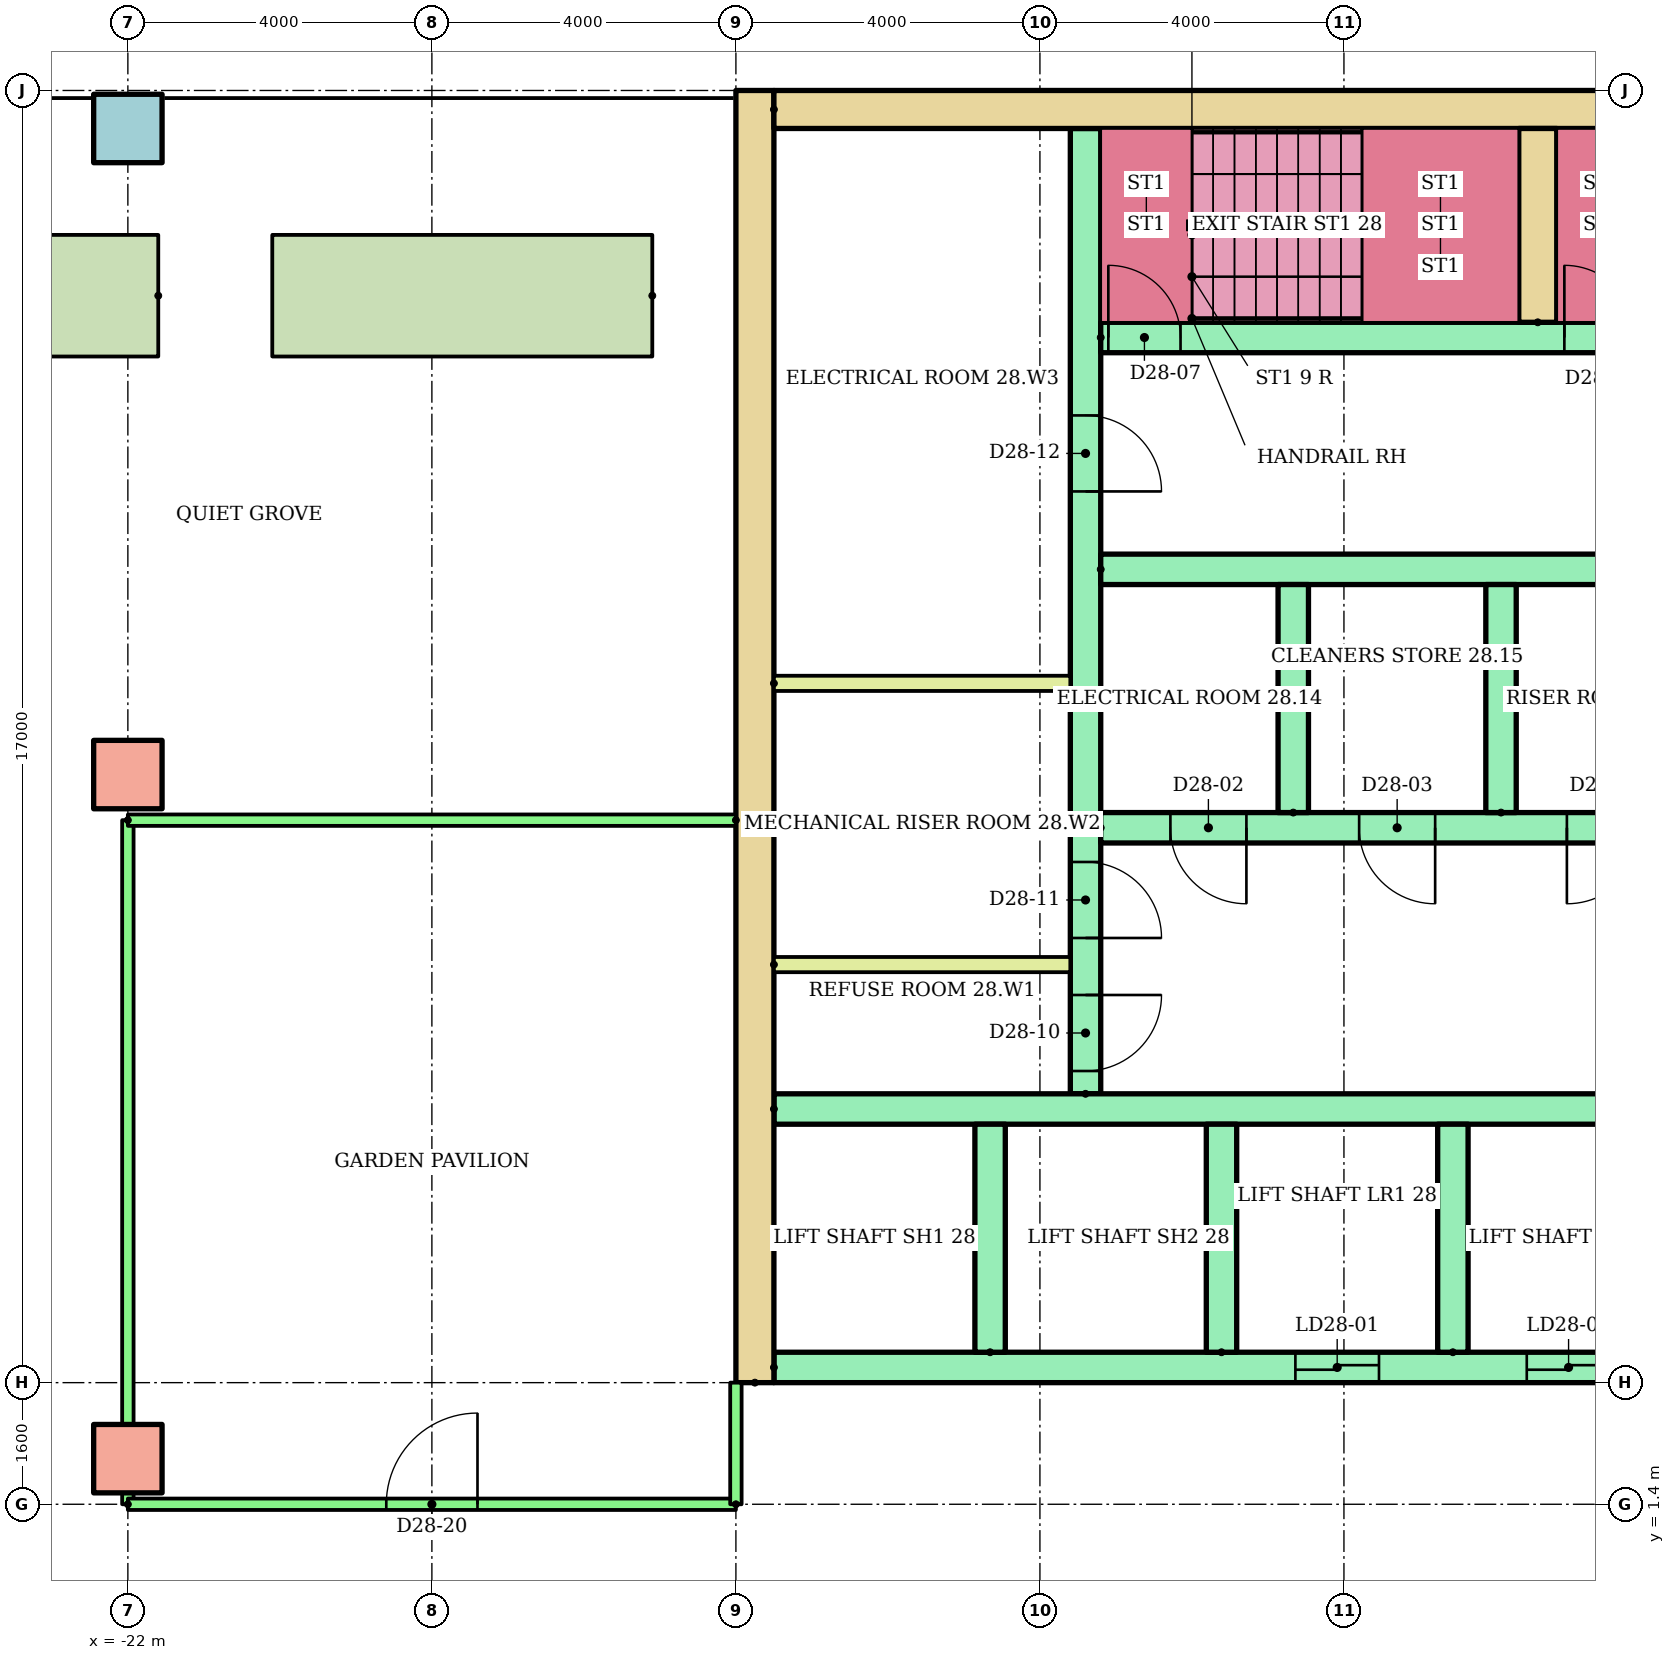
"""IFC4 building model, lengths in metres.
Left out: names, types, materials, properties, quantities, classifications, styles, units other than length and angle.
Written with IfcOpenShell. Run it as: python <this file> out.ifc"""

import sys

from ifc_helpers import new_model, si_unit, direction, frame, frame_2d, origin, origin_2d, place, context, subcontext, project, spatial, rectangle, hollow_rectangle, extrude, element, fill, save


model = new_model("IFC4")
c1 = context("Model", 3, precision=1e-05, world=origin(), true_north=direction((0.0, 1.0)))
c2 = subcontext(c1, "Body", "Model", "MODEL_VIEW")
j1 = project(units=[si_unit("LENGTHUNIT", "METRE"), si_unit("PLANEANGLEUNIT", "RADIAN")], contexts=[c1])
p1 = place(None, origin())
s1 = spatial("IfcSite", under=j1, at=p1, CompositionType="ELEMENT")
p2 = place(p1, origin())
s2 = spatial("IfcBuilding", under=s1, at=p2, CompositionType="ELEMENT")
p3 = place(p2, frame((0.0, 0.0, 106.3)))
s3 = spatial("IfcBuildingStorey", under=s2, at=p3, CompositionType="ELEMENT", Elevation=106.3)
for number, where in (
    (1, (-22.0, 2.0, 0.0)),
    (2, (-22.0, 11.0, 0.0)),
):
    element("IfcColumn", number, at=place(p3, frame(where)), inside=s3, PredefinedType="COLUMN", context=c2, shape_type="SweptSolid", body=[
        extrude(rectangle(XDim=0.9, YDim=0.9, at=origin_2d()), origin(), (0.0, 0.0, 1.0), 9.6),
    ])
p4 = place(p3, frame((-22.0, 19.5, 0.0)))
e3 = element("IfcColumn", 3, at=p4, inside=s3, PredefinedType="COLUMN", context=c2, shape_type="SweptSolid", body=[
    extrude(hollow_rectangle(XDim=0.9, YDim=0.9, WallThickness=0.045, at=origin_2d()), origin(), (0.0, 0.0, 1.0), 9.6),
])
p5 = place(p3, frame((-15.1, 17.3, 0.0), z_axis=(0.0, 0.0, 1.0), x_axis=(-1.0, 0.0, 0.0)))
e4 = element("IfcWall", 4, at=p5, inside=s3, PredefinedType="STANDARD", context=c2, shape_type="SweptSolid", body=[
    extrude(rectangle(XDim=5.0, YDim=1.6, at=frame_2d((2.5, 0.0))), origin(), (0.0, 0.0, 1.0), 0.8),
])
p6 = place(p3, frame((-21.6, 17.3, 0.0), z_axis=(0.0, 0.0, 1.0), x_axis=(-1.0, 0.0, 0.0)))
e5 = element("IfcWall", 5, at=p6, inside=s3, PredefinedType="STANDARD", context=c2, shape_type="SweptSolid", body=[
    extrude(rectangle(XDim=2.1, YDim=1.6, at=frame_2d((1.05, 0.0))), origin(), (0.0, 0.0, 1.0), 0.8),
])
p7 = place(p3, frame((-13.75, 3.0, 0.0), z_axis=(0.0, 0.0, 1.0), x_axis=(0.0, 1.0, 0.0)))
e6 = element("IfcWall", 6, at=p7, inside=s3, PredefinedType="SHEAR", context=c2, shape_type="SweptSolid", body=[
    extrude(rectangle(XDim=17.0, YDim=0.5, at=frame_2d((8.5, 0.0))), origin(), (0.0, 0.0, 1.0), 8.8),
])
p8 = place(p3, frame((-13.5, 19.75, 0.0)))
e7 = element("IfcWall", 7, at=p8, inside=s3, PredefinedType="SHEAR", context=c2, shape_type="SweptSolid", body=[
    extrude(rectangle(XDim=27.0, YDim=0.5, at=frame_2d((13.5, 0.0))), origin(), (0.0, 0.0, 1.0), 8.8),
])
p9 = place(p3, frame((-9.4, 6.8, 0.0), z_axis=(0.0, 0.0, 1.0), x_axis=(0.0, 1.0, 0.0)))
e8 = element("IfcWall", 8, at=p9, inside=s3, PredefinedType="SHEAR", context=c2, shape_type="SweptSolid", body=[
    extrude(rectangle(XDim=12.7, YDim=0.4, at=frame_2d((6.35, 0.0))), origin(), (0.0, 0.0, 1.0), 8.8),
])
p10 = place(p9, frame((0.3, 0.0, 0.0)))
e9 = element("IfcOpeningElement", 9, at=p10, cuts=e8, PredefinedType="OPENING", context=c2, shape_type="SweptSolid", body=[
    extrude(rectangle(XDim=1.0, YDim=2.1, at=frame_2d((0.5, 1.05))), frame((0.0, 0.21, 0.0), z_axis=(0.0, -1.0, 0.0), x_axis=(1.0, 0.0, 0.0)), (0.0, 0.0, 1.0), 0.42),
])
p11 = place(p9, frame((2.05, 0.0, 0.0)))
e10 = element("IfcOpeningElement", 10, at=p11, cuts=e8, PredefinedType="OPENING", context=c2, shape_type="SweptSolid", body=[
    extrude(rectangle(XDim=1.0, YDim=2.1, at=frame_2d((0.5, 1.05))), frame((0.0, 0.21, 0.0), z_axis=(0.0, -1.0, 0.0), x_axis=(1.0, 0.0, 0.0)), (0.0, 0.0, 1.0), 0.42),
])
p12 = place(p9, frame((7.925, 0.0, 0.0)))
e11 = element("IfcOpeningElement", 11, at=p12, cuts=e8, PredefinedType="OPENING", context=c2, shape_type="SweptSolid", body=[
    extrude(rectangle(XDim=1.0, YDim=2.1, at=frame_2d((0.5, 1.05))), frame((0.0, 0.21, 0.0), z_axis=(0.0, -1.0, 0.0), x_axis=(1.0, 0.0, 0.0)), (0.0, 0.0, 1.0), 0.42),
])
p13 = place(p3, frame((-13.5, 3.2, 0.0)))
e12 = element("IfcWall", 12, at=p13, inside=s3, PredefinedType="SHEAR", context=c2, shape_type="SweptSolid", body=[
    extrude(rectangle(XDim=27.0, YDim=0.4, at=frame_2d((13.5, 0.0))), origin(), (0.0, 0.0, 1.0), 8.8),
])
p14 = place(p13, frame((6.861, 0.0, 0.0)))
e13 = element("IfcOpeningElement", 13, at=p14, cuts=e12, PredefinedType="OPENING", context=c2, shape_type="SweptSolid", body=[
    extrude(rectangle(XDim=1.1, YDim=2.1, at=frame_2d((0.55, 1.05))), frame((0.0, 0.21, 0.0), z_axis=(0.0, -1.0, 0.0), x_axis=(1.0, 0.0, 0.0)), (0.0, 0.0, 1.0), 0.42),
])
p15 = place(p13, frame((9.906, 0.0, 0.0)))
e14 = element("IfcOpeningElement", 14, at=p15, cuts=e12, PredefinedType="OPENING", context=c2, shape_type="SweptSolid", body=[
    extrude(rectangle(XDim=1.1, YDim=2.1, at=frame_2d((0.55, 1.05))), frame((0.0, 0.21, 0.0), z_axis=(0.0, -1.0, 0.0), x_axis=(1.0, 0.0, 0.0)), (0.0, 0.0, 1.0), 0.42),
])
p16 = place(p13, frame((15.994, 0.0, 0.0)))
e15 = element("IfcOpeningElement", 15, at=p16, cuts=e12, PredefinedType="OPENING", context=c2, shape_type="SweptSolid", body=[
    extrude(rectangle(XDim=1.1, YDim=2.1, at=frame_2d((0.55, 1.05))), frame((0.0, 0.21, 0.0), z_axis=(0.0, -1.0, 0.0), x_axis=(1.0, 0.0, 0.0)), (0.0, 0.0, 1.0), 0.42),
])
p17 = place(p13, frame((19.039, 0.0, 0.0)))
e16 = element("IfcOpeningElement", 16, at=p17, cuts=e12, PredefinedType="OPENING", context=c2, shape_type="SweptSolid", body=[
    extrude(rectangle(XDim=1.1, YDim=2.1, at=frame_2d((0.55, 1.05))), frame((0.0, 0.21, 0.0), z_axis=(0.0, -1.0, 0.0), x_axis=(1.0, 0.0, 0.0)), (0.0, 0.0, 1.0), 0.42),
])
p18 = place(p13, frame((12.6, 0.0, 0.0)))
e17 = element("IfcOpeningElement", 17, at=p18, cuts=e12, PredefinedType="OPENING", context=c2, shape_type="SweptSolid", body=[
    extrude(rectangle(XDim=1.8, YDim=2.1, at=frame_2d((0.9, 1.05))), frame((0.0, 0.21, 0.0), z_axis=(0.0, -1.0, 0.0), x_axis=(1.0, 0.0, 0.0)), (0.0, 0.0, 1.0), 0.42),
])
p19 = place(p3, frame((-13.5, 6.6, 0.0)))
e18 = element("IfcWall", 18, at=p19, inside=s3, PredefinedType="SHEAR", context=c2, shape_type="SweptSolid", body=[
    extrude(rectangle(XDim=11.978, YDim=0.4, at=frame_2d((5.989, 0.0))), origin(), (0.0, 0.0, 1.0), 8.8),
])
for number, where, z_axis, x_axis in (
    (19, (-10.656, 3.4, 0.0), (0.0, 0.0, 1.0), (0.0, 1.0, 0.0)),
    (20, (-7.611, 3.4, 0.0), (0.0, 0.0, 1.0), (0.0, 1.0, 0.0)),
    (21, (-4.567, 3.4, 0.0), (0.0, 0.0, 1.0), (0.0, 1.0, 0.0)),
):
    element("IfcWall", number, at=place(p3, frame(where, z_axis=z_axis, x_axis=x_axis)), inside=s3, PredefinedType="SHEAR", context=c2, shape_type="SweptSolid", body=[
        extrude(rectangle(XDim=3.0, YDim=0.4, at=frame_2d((1.5, 0.0))), origin(), (0.0, 0.0, 1.0), 8.8),
    ])
p20 = place(p3, frame((-9.2, 10.3, 0.0)))
e22 = element("IfcWall", 22, at=p20, inside=s3, PredefinedType="SHEAR", context=c2, shape_type="SweptSolid", body=[
    extrude(rectangle(XDim=8.0, YDim=0.4, at=frame_2d((4.0, 0.0))), origin(), (0.0, 0.0, 1.0), 8.8),
])
p21 = place(p20, frame((0.917, 0.0, 0.0)))
e23 = element("IfcOpeningElement", 23, at=p21, cuts=e22, PredefinedType="OPENING", context=c2, shape_type="SweptSolid", body=[
    extrude(rectangle(XDim=1.0, YDim=2.1, at=frame_2d((0.5, 1.05))), frame((0.0, 0.21, 0.0), z_axis=(0.0, -1.0, 0.0), x_axis=(1.0, 0.0, 0.0)), (0.0, 0.0, 1.0), 0.42),
])
p22 = place(p20, frame((3.4, 0.0, 0.0)))
e24 = element("IfcOpeningElement", 24, at=p22, cuts=e22, PredefinedType="OPENING", context=c2, shape_type="SweptSolid", body=[
    extrude(rectangle(XDim=1.0, YDim=2.1, at=frame_2d((0.5, 1.05))), frame((0.0, 0.21, 0.0), z_axis=(0.0, -1.0, 0.0), x_axis=(1.0, 0.0, 0.0)), (0.0, 0.0, 1.0), 0.42),
])
p23 = place(p20, frame((6.133, 0.0, 0.0)))
e25 = element("IfcOpeningElement", 25, at=p23, cuts=e22, PredefinedType="OPENING", context=c2, shape_type="SweptSolid", body=[
    extrude(rectangle(XDim=1.0, YDim=2.1, at=frame_2d((0.5, 1.05))), frame((0.0, 0.21, 0.0), z_axis=(0.0, -1.0, 0.0), x_axis=(1.0, 0.0, 0.0)), (0.0, 0.0, 1.0), 0.42),
])
p24 = place(p3, frame((-9.2, 13.7, 0.0)))
e26 = element("IfcWall", 26, at=p24, inside=s3, PredefinedType="SHEAR", context=c2, shape_type="SweptSolid", body=[
    extrude(rectangle(XDim=8.0, YDim=0.4, at=frame_2d((4.0, 0.0))), origin(), (0.0, 0.0, 1.0), 8.8),
])
for number, where, z_axis, x_axis in (
    (27, (-6.667, 10.5, 0.0), (0.0, 0.0, 1.0), (0.0, 1.0, 0.0)),
    (28, (-3.933, 10.5, 0.0), (0.0, 0.0, 1.0), (0.0, 1.0, 0.0)),
):
    element("IfcWall", number, at=place(p3, frame(where, z_axis=z_axis, x_axis=x_axis)), inside=s3, PredefinedType="SHEAR", context=c2, shape_type="SweptSolid", body=[
        extrude(rectangle(XDim=3.0, YDim=0.4, at=frame_2d((1.5, 0.0))), origin(), (0.0, 0.0, 1.0), 8.8),
    ])
p25 = place(p3, frame((-9.2, 16.75, 0.0)))
e29 = element("IfcWall", 29, at=p25, inside=s3, PredefinedType="SHEAR", context=c2, shape_type="SweptSolid", body=[
    extrude(rectangle(XDim=18.4, YDim=0.4, at=frame_2d((9.2, 0.0))), origin(), (0.0, 0.0, 1.0), 8.8),
])
p26 = place(p25, frame((0.1, 0.0, 0.0)))
e30 = element("IfcOpeningElement", 30, at=p26, cuts=e29, PredefinedType="OPENING", context=c2, shape_type="SweptSolid", body=[
    extrude(rectangle(XDim=0.95, YDim=2.1, at=frame_2d((0.475, 1.05))), frame((0.0, 0.21, 0.0), z_axis=(0.0, -1.0, 0.0), x_axis=(1.0, 0.0, 0.0)), (0.0, 0.0, 1.0), 0.42),
])
p27 = place(p25, frame((6.1, 0.0, 0.0)))
e31 = element("IfcOpeningElement", 31, at=p27, cuts=e29, PredefinedType="OPENING", context=c2, shape_type="SweptSolid", body=[
    extrude(rectangle(XDim=0.95, YDim=2.1, at=frame_2d((0.475, 1.05))), frame((0.0, 0.21, 0.0), z_axis=(0.0, -1.0, 0.0), x_axis=(1.0, 0.0, 0.0)), (0.0, 0.0, 1.0), 0.42),
])
p28 = place(p25, frame((12.1, 0.0, 0.0)))
e32 = element("IfcOpeningElement", 32, at=p28, cuts=e29, PredefinedType="OPENING", context=c2, shape_type="SweptSolid", body=[
    extrude(rectangle(XDim=0.95, YDim=2.1, at=frame_2d((0.475, 1.05))), frame((0.0, 0.21, 0.0), z_axis=(0.0, -1.0, 0.0), x_axis=(1.0, 0.0, 0.0)), (0.0, 0.0, 1.0), 0.42),
])
p29 = place(p3, frame((-3.45, 16.95, 0.0), z_axis=(0.0, 0.0, 1.0), x_axis=(0.0, 1.0, 0.0)))
e33 = element("IfcWall", 33, at=p29, inside=s3, PredefinedType="SHEAR", context=c2, shape_type="SweptSolid", body=[
    extrude(rectangle(XDim=2.55, YDim=0.5, at=frame_2d((1.275, 0.0))), origin(), (0.0, 0.0, 1.0), 8.8),
])
for number, where in (
    (34, (-13.5, 8.5, 0.0)),
    (35, (-13.5, 12.2, 0.0)),
):
    element("IfcWall", number, at=place(p3, frame(where)), inside=s3, PredefinedType="PARTITIONING", context=c2, shape_type="SweptSolid", body=[
        extrude(rectangle(XDim=3.9, YDim=0.2, at=frame_2d((1.95, 0.0))), origin(), (0.0, 0.0, 1.0), 8.8),
    ])
p30 = place(p3, frame((-22.0, 10.4, 0.0), z_axis=(0.0, 0.0, 1.0), x_axis=(0.0, -1.0, 0.0)))
e36 = element("IfcWall", 36, at=p30, inside=s3, PredefinedType="PARTITIONING", context=c2, shape_type="SweptSolid", body=[
    extrude(rectangle(XDim=9.0, YDim=0.15, at=frame_2d((4.5, 0.0))), origin(), (0.0, 0.0, 1.0), 8.8),
])
p31 = place(p3, frame((-14.0, 10.4, 0.0), z_axis=(0.0, 0.0, 1.0), x_axis=(-1.0, 0.0, 0.0)))
e37 = element("IfcWall", 37, at=p31, inside=s3, PredefinedType="PARTITIONING", context=c2, shape_type="SweptSolid", body=[
    extrude(rectangle(XDim=8.0, YDim=0.15, at=frame_2d((4.0, 0.0))), origin(), (0.0, 0.0, 1.0), 8.8),
])
p32 = place(p3, frame((-22.0, 1.4, 0.0)))
e38 = element("IfcWall", 38, at=p32, inside=s3, PredefinedType="PARTITIONING", context=c2, shape_type="SweptSolid", body=[
    extrude(rectangle(XDim=8.0, YDim=0.15, at=frame_2d((4.0, 0.0))), origin(), (0.0, 0.0, 1.0), 8.8),
])
p33 = place(p32, frame((3.4, 0.0, 0.0)))
e39 = element("IfcOpeningElement", 39, at=p33, cuts=e38, PredefinedType="OPENING", context=c2, shape_type="SweptSolid", body=[
    extrude(rectangle(XDim=1.2, YDim=2.1, at=frame_2d((0.6, 1.05))), frame((0.0, 0.085, 0.0), z_axis=(0.0, -1.0, 0.0), x_axis=(1.0, 0.0, 0.0)), (0.0, 0.0, 1.0), 0.17),
])
p34 = place(p3, frame((-14.0, 1.4, 0.0), z_axis=(0.0, 0.0, 1.0), x_axis=(0.0, 1.0, 0.0)))
e40 = element("IfcWall", 40, at=p34, inside=s3, PredefinedType="PARTITIONING", context=c2, shape_type="SweptSolid", body=[
    extrude(rectangle(XDim=1.6, YDim=0.15, at=frame_2d((0.8, 0.0))), origin(), (0.0, 0.0, 1.0), 8.8),
])
p35 = place(p14, origin())
e41 = element("IfcDoor", 41, at=p35, inside=s3, OperationType="SLIDING_TO_LEFT", PredefinedType="DOOR", context=c2, shape_type="SweptSolid", body=[
    extrude(rectangle(XDim=1.1, YDim=2.1, at=frame_2d((0.55, 1.05))), frame((0.0, 0.025, 0.0), z_axis=(0.0, -1.0, 0.0), x_axis=(1.0, 0.0, 0.0)), (0.0, 0.0, 1.0), 0.05),
])
fill(e13, e41)
p36 = place(p15, origin())
e42 = element("IfcDoor", 42, at=p36, inside=s3, OperationType="SLIDING_TO_LEFT", PredefinedType="DOOR", context=c2, shape_type="SweptSolid", body=[
    extrude(rectangle(XDim=1.1, YDim=2.1, at=frame_2d((0.55, 1.05))), frame((0.0, 0.025, 0.0), z_axis=(0.0, -1.0, 0.0), x_axis=(1.0, 0.0, 0.0)), (0.0, 0.0, 1.0), 0.05),
])
fill(e14, e42)
p37 = place(p21, frame((1.0, 0.0, 0.0), z_axis=(0.0, 0.0, 1.0), x_axis=(-1.0, 0.0, 0.0)))
e43 = element("IfcDoor", 43, at=p37, inside=s3, OperationType="SINGLE_SWING_RIGHT", PredefinedType="DOOR", context=c2, shape_type="SweptSolid", body=[
    extrude(rectangle(XDim=1.0, YDim=2.1, at=frame_2d((0.5, 1.05))), frame((0.0, 0.025, 0.0), z_axis=(0.0, -1.0, 0.0), x_axis=(1.0, 0.0, 0.0)), (0.0, 0.0, 1.0), 0.05),
])
fill(e23, e43)
p38 = place(p22, frame((1.0, 0.0, 0.0), z_axis=(0.0, 0.0, 1.0), x_axis=(-1.0, 0.0, 0.0)))
e44 = element("IfcDoor", 44, at=p38, inside=s3, OperationType="SINGLE_SWING_RIGHT", PredefinedType="DOOR", context=c2, shape_type="SweptSolid", body=[
    extrude(rectangle(XDim=1.0, YDim=2.1, at=frame_2d((0.5, 1.05))), frame((0.0, 0.025, 0.0), z_axis=(0.0, -1.0, 0.0), x_axis=(1.0, 0.0, 0.0)), (0.0, 0.0, 1.0), 0.05),
])
fill(e24, e44)
p39 = place(p23, frame((1.0, 0.0, 0.0), z_axis=(0.0, 0.0, 1.0), x_axis=(-1.0, 0.0, 0.0)))
e45 = element("IfcDoor", 45, at=p39, inside=s3, OperationType="SINGLE_SWING_LEFT", PredefinedType="DOOR", context=c2, shape_type="SweptSolid", body=[
    extrude(rectangle(XDim=1.0, YDim=2.1, at=frame_2d((0.5, 1.05))), frame((0.0, 0.025, 0.0), z_axis=(0.0, -1.0, 0.0), x_axis=(1.0, 0.0, 0.0)), (0.0, 0.0, 1.0), 0.05),
])
fill(e25, e45)
p40 = place(p26, origin())
e46 = element("IfcDoor", 46, at=p40, inside=s3, OperationType="SINGLE_SWING_LEFT", PredefinedType="DOOR", context=c2, shape_type="SweptSolid", body=[
    extrude(rectangle(XDim=0.95, YDim=2.1, at=frame_2d((0.475, 1.05))), frame((0.0, 0.025, 0.0), z_axis=(0.0, -1.0, 0.0), x_axis=(1.0, 0.0, 0.0)), (0.0, 0.0, 1.0), 0.05),
])
fill(e30, e46)
p41 = place(p27, origin())
e47 = element("IfcDoor", 47, at=p41, inside=s3, OperationType="SINGLE_SWING_LEFT", PredefinedType="DOOR", context=c2, shape_type="SweptSolid", body=[
    extrude(rectangle(XDim=0.95, YDim=2.1, at=frame_2d((0.475, 1.05))), frame((0.0, 0.025, 0.0), z_axis=(0.0, -1.0, 0.0), x_axis=(1.0, 0.0, 0.0)), (0.0, 0.0, 1.0), 0.05),
])
fill(e31, e47)
p42 = place(p10, frame((1.0, 0.0, 0.0), z_axis=(0.0, 0.0, 1.0), x_axis=(-1.0, 0.0, 0.0)))
e48 = element("IfcDoor", 48, at=p42, inside=s3, OperationType="SINGLE_SWING_RIGHT", PredefinedType="DOOR", context=c2, shape_type="SweptSolid", body=[
    extrude(rectangle(XDim=1.0, YDim=2.1, at=frame_2d((0.5, 1.05))), frame((0.0, 0.025, 0.0), z_axis=(0.0, -1.0, 0.0), x_axis=(1.0, 0.0, 0.0)), (0.0, 0.0, 1.0), 0.05),
])
fill(e9, e48)
p43 = place(p11, frame((1.0, 0.0, 0.0), z_axis=(0.0, 0.0, 1.0), x_axis=(-1.0, 0.0, 0.0)))
e49 = element("IfcDoor", 49, at=p43, inside=s3, OperationType="SINGLE_SWING_LEFT", PredefinedType="DOOR", context=c2, shape_type="SweptSolid", body=[
    extrude(rectangle(XDim=1.0, YDim=2.1, at=frame_2d((0.5, 1.05))), frame((0.0, 0.025, 0.0), z_axis=(0.0, -1.0, 0.0), x_axis=(1.0, 0.0, 0.0)), (0.0, 0.0, 1.0), 0.05),
])
fill(e10, e49)
p44 = place(p12, frame((1.0, 0.0, 0.0), z_axis=(0.0, 0.0, 1.0), x_axis=(-1.0, 0.0, 0.0)))
e50 = element("IfcDoor", 50, at=p44, inside=s3, OperationType="SINGLE_SWING_LEFT", PredefinedType="DOOR", context=c2, shape_type="SweptSolid", body=[
    extrude(rectangle(XDim=1.0, YDim=2.1, at=frame_2d((0.5, 1.05))), frame((0.0, 0.025, 0.0), z_axis=(0.0, -1.0, 0.0), x_axis=(1.0, 0.0, 0.0)), (0.0, 0.0, 1.0), 0.05),
])
fill(e11, e50)
p45 = place(p33, origin())
e51 = element("IfcDoor", 51, at=p45, inside=s3, OperationType="SINGLE_SWING_RIGHT", PredefinedType="DOOR", context=c2, shape_type="SweptSolid", body=[
    extrude(rectangle(XDim=1.2, YDim=2.1, at=frame_2d((0.6, 1.05))), frame((0.0, 0.025, 0.0), z_axis=(0.0, -1.0, 0.0), x_axis=(1.0, 0.0, 0.0)), (0.0, 0.0, 1.0), 0.05),
])
fill(e39, e51)
save(model, sys.argv[1])
